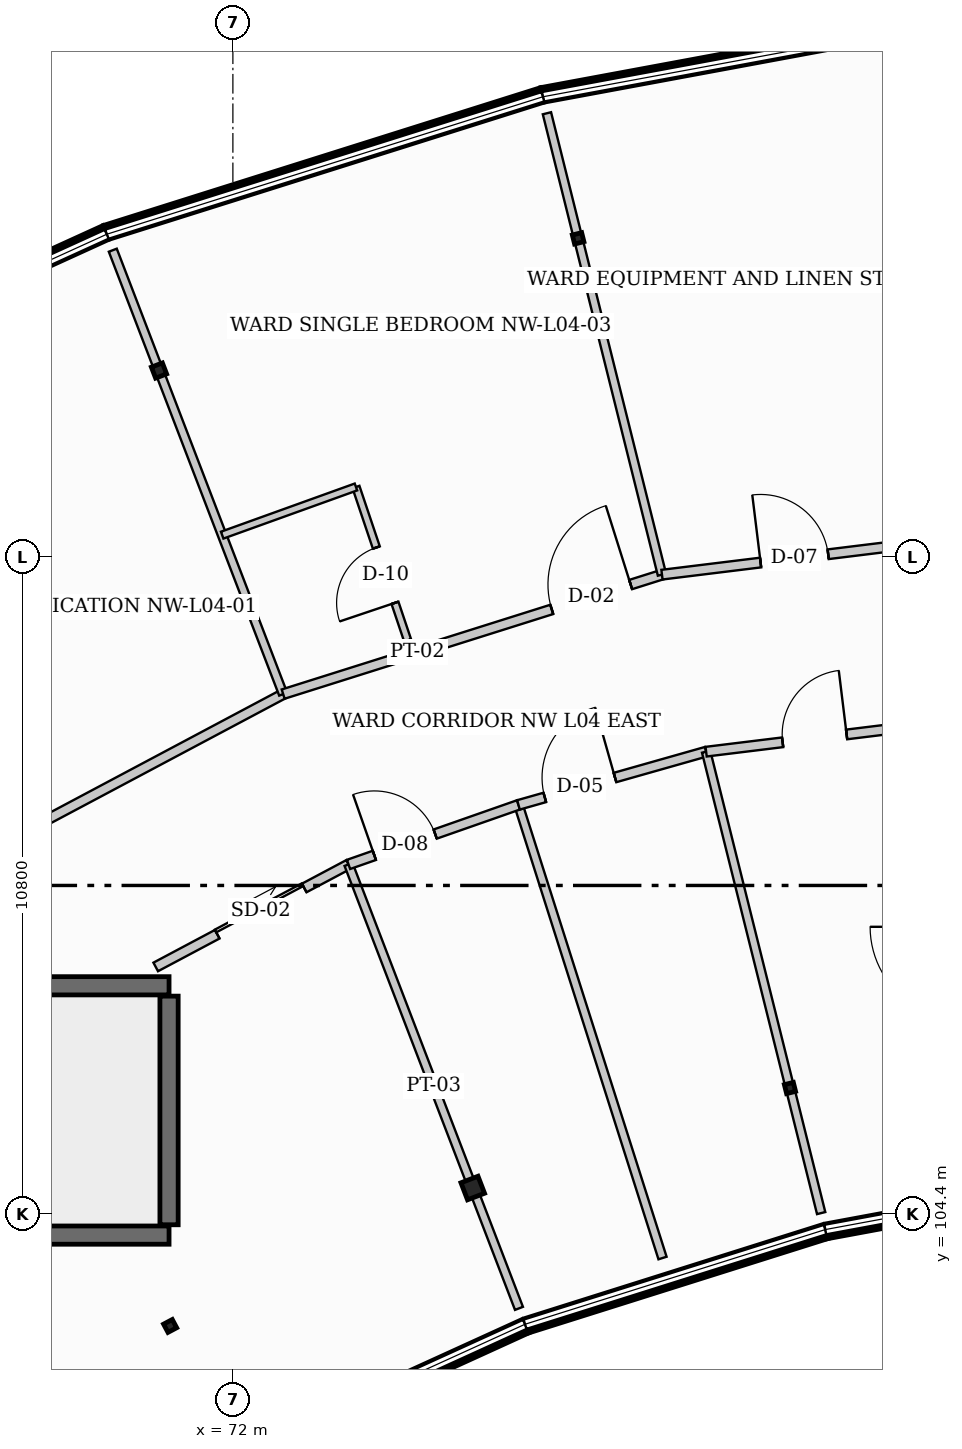
"""IFC4 building model, lengths in metres.
Left out: names, types, materials, properties, quantities, classifications, styles, units other than length and angle.
Written with IfcOpenShell. Run it as: python <this file> out.ifc"""

import sys

from ifc_helpers import new_model, si_unit, direction, frame, frame_2d, origin, origin_2d, place, context, subcontext, project, spatial, rectangle, hollow_rectangle, hollow_circle, i_section, extrude, element, fill, save


model = new_model("IFC4")
c1 = context("Model", 3, precision=1e-05, world=origin(), true_north=direction((0.0, 1.0)))
c2 = subcontext(c1, "Body", "Model", "MODEL_VIEW")
j1 = project(units=[si_unit("LENGTHUNIT", "METRE"), si_unit("PLANEANGLEUNIT", "RADIAN")], contexts=[c1])
p1 = place(None, origin())
s1 = spatial("IfcSite", under=j1, at=p1, CompositionType="ELEMENT")
p2 = place(p1, origin())
s2 = spatial("IfcBuilding", under=s1, at=p2, CompositionType="ELEMENT")
p3 = place(p2, frame((0.0, 0.0, 18.3)))
s3 = spatial("IfcBuildingStorey", under=s2, at=p3, CompositionType="ELEMENT", Elevation=18.3)
p4 = place(p3, frame((70.968, 102.556, 0.0), z_axis=(0.0, 0.0, 1.0), x_axis=(-0.469471562786, 0.882947592859, 0.0)))
e1 = element("IfcColumn", 1, at=p4, inside=s3, PredefinedType="COLUMN", context=c2, shape_type="SweptSolid", body=[
    extrude(i_section(OverallWidth=0.154, OverallDepth=0.162, WebThickness=0.008, FlangeThickness=0.011, at=origin_2d()), origin(), (0.0, 0.0, 1.0), 3.9),
])
p5 = place(p3, frame((70.785, 118.268, 0.0), z_axis=(0.0, 0.0, 1.0), x_axis=(-0.358367949545, 0.933580426497, 0.0)))
e2 = element("IfcColumn", 2, at=p5, inside=s3, PredefinedType="COLUMN", context=c2, shape_type="SweptSolid", body=[
    extrude(hollow_circle(Radius=0.097, WallThickness=0.008, at=origin_2d()), origin(), (0.0, 0.0, 1.0), 3.9),
])
p6 = place(p3, frame((75.945, 104.824, 0.0), z_axis=(0.0, 0.0, 1.0), x_axis=(-0.358367949545, 0.933580426497, 0.0)))
e3 = element("IfcColumn", 3, at=p6, inside=s3, PredefinedType="COLUMN", context=c2, shape_type="SweptSolid", body=[
    extrude(hollow_rectangle(XDim=0.3, YDim=0.3, WallThickness=0.012, at=origin_2d()), origin(), (0.0, 0.0, 1.0), 3.9),
])
p7 = place(p3, frame((77.678, 120.442, 0.0), z_axis=(0.0, 0.0, 1.0), x_axis=(-0.2419218956, 0.970295726276, 0.0)))
e4 = element("IfcColumn", 4, at=p7, inside=s3, PredefinedType="COLUMN", context=c2, shape_type="SweptSolid", body=[
    extrude(i_section(OverallWidth=0.153, OverallDepth=0.158, WebThickness=0.007, FlangeThickness=0.01, at=origin_2d()), origin(), (0.0, 0.0, 1.0), 3.9),
])
p8 = place(p3, frame((81.162, 106.469, 0.0), z_axis=(0.0, 0.0, 1.0), x_axis=(-0.2419218956, 0.970295726276, 0.0)))
e5 = element("IfcColumn", 5, at=p8, inside=s3, PredefinedType="COLUMN", context=c2, shape_type="SweptSolid", body=[
    extrude(i_section(OverallWidth=0.152, OverallDepth=0.152, WebThickness=0.006, FlangeThickness=0.007, at=origin_2d()), origin(), (0.0, 0.0, 1.0), 3.9),
])
p9 = place(p3, frame((62.25, 104.05, 0.0), z_axis=(0.0, 0.0, 1.0), x_axis=(1.0, 0.0, 0.0)))
e6 = element("IfcWall", 6, at=p9, inside=s3, PredefinedType="SHEAR", context=c2, shape_type="SweptSolid", body=[
    extrude(rectangle(XDim=8.7, YDim=0.3, at=frame_2d((4.35, 0.0))), origin(), (0.0, 0.0, 1.0), 3.9),
])
p10 = place(p9, frame((0.35, 0.0, 0.0)))
e7 = element("IfcOpeningElement", 7, at=p10, cuts=e6, PredefinedType="OPENING", context=c2, shape_type="SweptSolid", body=[
    extrude(rectangle(XDim=1.1, YDim=2.15, at=frame_2d((0.55, 1.075))), frame((0.0, 0.16, 0.0), z_axis=(0.0, -1.0, 0.0), x_axis=(1.0, 0.0, 0.0)), (0.0, 0.0, 1.0), 0.32),
])
p11 = place(p3, frame((70.95, 108.15, 0.0), z_axis=(0.0, 0.0, 1.0), x_axis=(-1.0, 0.0, 0.0)))
e8 = element("IfcWall", 8, at=p11, inside=s3, PredefinedType="SHEAR", context=c2, shape_type="SweptSolid", body=[
    extrude(rectangle(XDim=8.7, YDim=0.3, at=frame_2d((4.35, 0.0))), origin(), (0.0, 0.0, 1.0), 3.9),
])
p12 = place(p3, frame((70.95, 104.22, 0.0), z_axis=(0.0, 0.0, 1.0), x_axis=(0.0, 1.0, 0.0)))
e9 = element("IfcWall", 9, at=p12, inside=s3, PredefinedType="SHEAR", context=c2, shape_type="SweptSolid", body=[
    extrude(rectangle(XDim=3.76, YDim=0.3, at=frame_2d((1.88, 0.0))), origin(), (0.0, 0.0, 1.0), 3.9),
])
p13 = place(p3, frame((76.805, 102.584, 0.0), z_axis=(0.0, 0.0, 1.0), x_axis=(-0.909955822384, -0.414705198074, 0.0)))
e10 = element("IfcWall", 10, at=p13, inside=s3, PredefinedType="STANDARD", context=c2, shape_type="SweptSolid", body=[
    extrude(rectangle(XDim=5.177, YDim=0.22, at=frame_2d((2.588, 0.0))), origin(), (0.0, 0.0, 1.0), 1.05),
])
p14 = place(p3, frame((81.743, 104.141, 0.0), z_axis=(0.0, 0.0, 1.0), x_axis=(-0.953706582316, -0.300738681994, 0.0)))
e11 = element("IfcWall", 11, at=p14, inside=s3, PredefinedType="STANDARD", context=c2, shape_type="SweptSolid", body=[
    extrude(rectangle(XDim=5.178, YDim=0.22, at=frame_2d((2.589, 0.0))), origin(), (0.0, 0.0, 1.0), 1.05),
])
p15 = place(p3, frame((86.833, 105.084, 0.0), z_axis=(0.0, 0.0, 1.0), x_axis=(-0.98327293422, -0.182138235501, 0.0)))
e12 = element("IfcWall", 12, at=p15, inside=s3, PredefinedType="STANDARD", context=c2, shape_type="SweptSolid", body=[
    extrude(rectangle(XDim=5.177, YDim=0.22, at=frame_2d((2.588, 0.0))), origin(), (0.0, 0.0, 1.0), 1.05),
])
p16 = place(p3, frame((77.098, 122.77, 0.0), z_axis=(0.0, 0.0, 1.0), x_axis=(0.983242805192, 0.18230081195, 0.0)))
e13 = element("IfcWall", 13, at=p16, inside=s3, PredefinedType="STANDARD", context=c2, shape_type="SweptSolid", body=[
    extrude(rectangle(XDim=7.521, YDim=0.22, at=frame_2d((3.76, 0.0))), origin(), (0.0, 0.0, 1.0), 1.05),
])
p17 = place(p3, frame((69.925, 120.509, 0.0), z_axis=(0.0, 0.0, 1.0), x_axis=(0.953740021466, 0.300632618747, 0.0)))
e14 = element("IfcWall", 14, at=p17, inside=s3, PredefinedType="STANDARD", context=c2, shape_type="SweptSolid", body=[
    extrude(rectangle(XDim=7.521, YDim=0.22, at=frame_2d((3.76, 0.0))), origin(), (0.0, 0.0, 1.0), 1.05),
])
p18 = place(p3, frame((63.081, 117.39, 0.0), z_axis=(0.0, 0.0, 1.0), x_axis=(0.909953604353, 0.414710064895, 0.0)))
e15 = element("IfcWall", 15, at=p18, inside=s3, PredefinedType="STANDARD", context=c2, shape_type="SweptSolid", body=[
    extrude(rectangle(XDim=7.521, YDim=0.22, at=frame_2d((3.761, 0.0))), origin(), (0.0, 0.0, 1.0), 1.05),
])
p19 = place(p3, frame((64.389, 108.46, 0.0), z_axis=(0.0, 0.0, 1.0), x_axis=(0.882925792416, 0.46951256116, 0.0)))
e16 = element("IfcWall", 16, at=p19, inside=s3, PredefinedType="PARTITIONING", context=c2, shape_type="SweptSolid", body=[
    extrude(rectangle(XDim=9.557, YDim=0.16, at=frame_2d((4.778, 0.0))), origin(), (0.0, 0.0, 1.0), 2.933),
])
p20 = place(p19, frame((4.129, 0.0, 0.0)))
e17 = element("IfcOpeningElement", 17, at=p20, cuts=e16, PredefinedType="OPENING", context=c2, shape_type="SweptSolid", body=[
    extrude(rectangle(XDim=0.92, YDim=2.04, at=frame_2d((0.46, 1.02))), frame((0.0, 0.09, 0.0), z_axis=(0.0, -1.0, 0.0), x_axis=(1.0, 0.0, 0.0)), (0.0, 0.0, 1.0), 0.18),
])
p21 = place(p3, frame((72.827, 112.947, 0.0), z_axis=(0.0, 0.0, 1.0), x_axis=(-0.358342954102, 0.933590020965, 0.0)))
e18 = element("IfcWall", 18, at=p21, inside=s3, PredefinedType="PARTITIONING", context=c2, shape_type="SweptSolid", body=[
    extrude(rectangle(XDim=7.819, YDim=0.14, at=frame_2d((3.91, 0.0))), origin(), (0.0, 0.0, 1.0), 2.933),
])
p22 = place(p3, frame((70.731, 108.46, 0.0), z_axis=(0.0, 0.0, 1.0), x_axis=(0.882958125757, 0.46945175275, 0.0)))
e19 = element("IfcWall", 19, at=p22, inside=s3, PredefinedType="PARTITIONING", context=c2, shape_type="SweptSolid", body=[
    extrude(rectangle(XDim=3.592, YDim=0.16, at=frame_2d((1.796, 0.0))), origin(), (0.0, 0.0, 1.0), 2.933),
])
p23 = place(p22, frame((1.146, 0.0, 0.0)))
e20 = element("IfcOpeningElement", 20, at=p23, cuts=e19, PredefinedType="OPENING", context=c2, shape_type="SweptSolid", body=[
    extrude(rectangle(XDim=1.62, YDim=2.3, at=frame_2d((0.81, 1.15))), frame((0.0, 0.09, 0.0), z_axis=(0.0, -1.0, 0.0), x_axis=(1.0, 0.0, 0.0)), (0.0, 0.0, 1.0), 0.18),
])
p24 = place(p3, frame((73.902, 110.146, 0.0), z_axis=(0.0, 0.0, 1.0), x_axis=(0.358410014332, -0.933564278251, 0.0)))
e21 = element("IfcWall", 21, at=p24, inside=s3, PredefinedType="PARTITIONING", context=c2, shape_type="SweptSolid", body=[
    extrude(rectangle(XDim=7.821, YDim=0.14, at=frame_2d((3.91, 0.0))), origin(), (0.0, 0.0, 1.0), 2.933),
])
p25 = place(p3, frame((74.873, 113.832, 0.0), z_axis=(0.0, 0.0, 1.0), x_axis=(-0.319199781595, 0.947687448176, 0.0)))
e22 = element("IfcWall", 22, at=p25, inside=s3, PredefinedType="PARTITIONING", context=c2, shape_type="SweptSolid", body=[
    extrude(rectangle(XDim=2.66, YDim=0.12, at=frame_2d((1.33, 0.0))), origin(), (0.0, 0.0, 1.0), 3.189),
])
p26 = place(p25, frame((0.65, 0.0, 0.0)))
e23 = element("IfcOpeningElement", 23, at=p26, cuts=e22, PredefinedType="OPENING", context=c2, shape_type="SweptSolid", body=[
    extrude(rectangle(XDim=0.96, YDim=2.06, at=frame_2d((0.48, 1.03))), frame((0.0, 0.07, 0.0), z_axis=(0.0, -1.0, 0.0), x_axis=(1.0, 0.0, 0.0)), (0.0, 0.0, 1.0), 0.14),
])
p27 = place(p3, frame((71.824, 115.561, 0.0), z_axis=(0.0, 0.0, 1.0), x_axis=(0.940886080788, 0.338723165695, 0.0)))
e24 = element("IfcWall", 24, at=p27, inside=s3, PredefinedType="PARTITIONING", context=c2, shape_type="SweptSolid", body=[
    extrude(rectangle(XDim=2.338, YDim=0.12, at=frame_2d((1.169, 0.0))), origin(), (0.0, 0.0, 1.0), 2.933),
])
p28 = place(p3, frame((72.827, 112.947, 0.0), z_axis=(0.0, 0.0, 1.0), x_axis=(0.953736183483, 0.30064479426, 0.0)))
e25 = element("IfcWall", 25, at=p28, inside=s3, PredefinedType="PARTITIONING", context=c2, shape_type="SweptSolid", body=[
    extrude(rectangle(XDim=6.532, YDim=0.16, at=frame_2d((3.266, 0.0))), origin(), (0.0, 0.0, 1.0), 2.933),
])
p29 = place(p28, frame((4.632, 0.0, 0.0)))
e26 = element("IfcOpeningElement", 26, at=p29, cuts=e25, PredefinedType="OPENING", context=c2, shape_type="SweptSolid", body=[
    extrude(rectangle(XDim=1.36, YDim=2.18, at=frame_2d((0.68, 1.09))), frame((0.0, 0.09, 0.0), z_axis=(0.0, -1.0, 0.0), x_axis=(1.0, 0.0, 0.0)), (0.0, 0.0, 1.0), 0.18),
])
p30 = place(p3, frame((79.057, 114.911, 0.0), z_axis=(0.0, 0.0, 1.0), x_axis=(-0.241911207257, 0.970298391117, 0.0)))
e27 = element("IfcWall", 27, at=p30, inside=s3, PredefinedType="PARTITIONING", context=c2, shape_type="SweptSolid", body=[
    extrude(rectangle(XDim=7.82, YDim=0.14, at=frame_2d((3.91, 0.0))), origin(), (0.0, 0.0, 1.0), 2.938),
])
p31 = place(p3, frame((76.697, 111.125, 0.0), z_axis=(0.0, 0.0, 1.0), x_axis=(0.302952343331, -0.95300570705, 0.0)))
e28 = element("IfcWall", 28, at=p31, inside=s3, PredefinedType="PARTITIONING", context=c2, shape_type="SweptSolid", body=[
    extrude(rectangle(XDim=7.819, YDim=0.14, at=frame_2d((3.91, 0.0))), origin(), (0.0, 0.0, 1.0), 3.241),
])
p32 = place(p3, frame((73.902, 110.146, 0.0), z_axis=(0.0, 0.0, 1.0), x_axis=(0.943776070457, 0.330585433485, 0.0)))
e29 = element("IfcWall", 29, at=p32, inside=s3, PredefinedType="PARTITIONING", context=c2, shape_type="SweptSolid", body=[
    extrude(rectangle(XDim=2.961, YDim=0.16, at=frame_2d((1.481, 0.0))), origin(), (0.0, 0.0, 1.0), 2.933),
])
p33 = place(p32, frame((0.45, 0.0, 0.0)))
e30 = element("IfcOpeningElement", 30, at=p33, cuts=e29, PredefinedType="OPENING", context=c2, shape_type="SweptSolid", body=[
    extrude(rectangle(XDim=1.06, YDim=2.1, at=frame_2d((0.53, 1.05))), frame((0.0, 0.09, 0.0), z_axis=(0.0, -1.0, 0.0), x_axis=(1.0, 0.0, 0.0)), (0.0, 0.0, 1.0), 0.18),
])
p34 = place(p3, frame((76.697, 111.125, 0.0), z_axis=(0.0, 0.0, 1.0), x_axis=(0.962073473599, 0.272790453274, 0.0)))
e31 = element("IfcWall", 31, at=p34, inside=s3, PredefinedType="PARTITIONING", context=c2, shape_type="SweptSolid", body=[
    extrude(rectangle(XDim=3.208, YDim=0.16, at=frame_2d((1.604, 0.0))), origin(), (0.0, 0.0, 1.0), 2.938),
])
p35 = place(p34, frame((0.45, 0.0, 0.0)))
e32 = element("IfcOpeningElement", 32, at=p35, cuts=e31, PredefinedType="OPENING", context=c2, shape_type="SweptSolid", body=[
    extrude(rectangle(XDim=1.2, YDim=2.12, at=frame_2d((0.6, 1.06))), frame((0.0, 0.09, 0.0), z_axis=(0.0, -1.0, 0.0), x_axis=(1.0, 0.0, 0.0)), (0.0, 0.0, 1.0), 0.18),
])
p36 = place(p3, frame((79.783, 112.0, 0.0), z_axis=(0.0, 0.0, 1.0), x_axis=(0.241947927131, -0.970289235515, 0.0)))
e33 = element("IfcWall", 33, at=p36, inside=s3, PredefinedType="PARTITIONING", context=c2, shape_type="SweptSolid", body=[
    extrude(rectangle(XDim=7.82, YDim=0.14, at=frame_2d((3.91, 0.0))), origin(), (0.0, 0.0, 1.0), 2.938),
])
p37 = place(p3, frame((79.057, 114.911, 0.0), z_axis=(0.0, 0.0, 1.0), x_axis=(0.992532332473, 0.121981838793, 0.0)))
e34 = element("IfcWall", 34, at=p37, inside=s3, PredefinedType="PARTITIONING", context=c2, shape_type="SweptSolid", body=[
    extrude(rectangle(XDim=4.567, YDim=0.16, at=frame_2d((2.284, 0.0))), origin(), (0.0, 0.0, 1.0), 2.938),
])
p38 = place(p37, frame((1.634, 0.0, 0.0)))
e35 = element("IfcOpeningElement", 35, at=p38, cuts=e34, PredefinedType="OPENING", context=c2, shape_type="SweptSolid", body=[
    extrude(rectangle(XDim=1.12, YDim=2.08, at=frame_2d((0.56, 1.04))), frame((0.0, 0.09, 0.0), z_axis=(0.0, -1.0, 0.0), x_axis=(1.0, 0.0, 0.0)), (0.0, 0.0, 1.0), 0.18),
])
p39 = place(p3, frame((79.783, 112.0, 0.0), z_axis=(0.0, 0.0, 1.0), x_axis=(0.992559253302, 0.121762591482, 0.0)))
e36 = element("IfcWall", 36, at=p39, inside=s3, PredefinedType="PARTITIONING", context=c2, shape_type="SweptSolid", body=[
    extrude(rectangle(XDim=3.836, YDim=0.16, at=frame_2d((1.918, 0.0))), origin(), (0.0, 0.0, 1.0), 2.938),
])
p40 = place(p39, frame((1.268, 0.0, 0.0)))
e37 = element("IfcOpeningElement", 37, at=p40, cuts=e36, PredefinedType="OPENING", context=c2, shape_type="SweptSolid", body=[
    extrude(rectangle(XDim=1.06, YDim=2.1, at=frame_2d((0.53, 1.05))), frame((0.0, 0.09, 0.0), z_axis=(0.0, -1.0, 0.0), x_axis=(1.0, 0.0, 0.0)), (0.0, 0.0, 1.0), 0.18),
])
p41 = place(p23, origin())
e38 = element("IfcDoor", 38, at=p41, inside=s3, OperationType="SLIDING_TO_RIGHT", PredefinedType="DOOR", context=c2, shape_type="SweptSolid", body=[
    extrude(rectangle(XDim=1.62, YDim=2.3, at=frame_2d((0.81, 1.15))), frame((0.0, 0.025, 0.0), z_axis=(0.0, -1.0, 0.0), x_axis=(1.0, 0.0, 0.0)), (0.0, 0.0, 1.0), 0.05),
])
fill(e20, e38)
p42 = place(p26, origin())
e39 = element("IfcDoor", 39, at=p42, inside=s3, OperationType="SINGLE_SWING_LEFT", PredefinedType="DOOR", context=c2, shape_type="SweptSolid", body=[
    extrude(rectangle(XDim=0.96, YDim=2.06, at=frame_2d((0.48, 1.03))), frame((0.0, 0.025, 0.0), z_axis=(0.0, -1.0, 0.0), x_axis=(1.0, 0.0, 0.0)), (0.0, 0.0, 1.0), 0.05),
])
fill(e23, e39)
p43 = place(p29, origin())
e40 = element("IfcDoor", 40, at=p43, inside=s3, OperationType="SINGLE_SWING_RIGHT", PredefinedType="DOOR", context=c2, shape_type="SweptSolid", body=[
    extrude(rectangle(XDim=1.36, YDim=2.18, at=frame_2d((0.68, 1.09))), frame((0.0, 0.025, 0.0), z_axis=(0.0, -1.0, 0.0), x_axis=(1.0, 0.0, 0.0)), (0.0, 0.0, 1.0), 0.05),
])
fill(e26, e40)
p44 = place(p33, origin())
e41 = element("IfcDoor", 41, at=p44, inside=s3, OperationType="SINGLE_SWING_LEFT", PredefinedType="DOOR", context=c2, shape_type="SweptSolid", body=[
    extrude(rectangle(XDim=1.06, YDim=2.1, at=frame_2d((0.53, 1.05))), frame((0.0, 0.025, 0.0), z_axis=(0.0, -1.0, 0.0), x_axis=(1.0, 0.0, 0.0)), (0.0, 0.0, 1.0), 0.05),
])
fill(e30, e41)
p45 = place(p35, origin())
e42 = element("IfcDoor", 42, at=p45, inside=s3, OperationType="SINGLE_SWING_RIGHT", PredefinedType="DOOR", context=c2, shape_type="SweptSolid", body=[
    extrude(rectangle(XDim=1.2, YDim=2.12, at=frame_2d((0.6, 1.06))), frame((0.0, 0.025, 0.0), z_axis=(0.0, -1.0, 0.0), x_axis=(1.0, 0.0, 0.0)), (0.0, 0.0, 1.0), 0.05),
])
fill(e32, e42)
p46 = place(p38, origin())
e43 = element("IfcDoor", 43, at=p46, inside=s3, OperationType="SINGLE_SWING_LEFT", PredefinedType="DOOR", context=c2, shape_type="SweptSolid", body=[
    extrude(rectangle(XDim=1.12, YDim=2.08, at=frame_2d((0.56, 1.04))), frame((0.0, 0.025, 0.0), z_axis=(0.0, -1.0, 0.0), x_axis=(1.0, 0.0, 0.0)), (0.0, 0.0, 1.0), 0.05),
])
fill(e35, e43)
p47 = place(p40, origin())
e44 = element("IfcDoor", 44, at=p47, inside=s3, OperationType="SINGLE_SWING_RIGHT", PredefinedType="DOOR", context=c2, shape_type="SweptSolid", body=[
    extrude(rectangle(XDim=1.06, YDim=2.1, at=frame_2d((0.53, 1.05))), frame((0.0, 0.025, 0.0), z_axis=(0.0, -1.0, 0.0), x_axis=(1.0, 0.0, 0.0)), (0.0, 0.0, 1.0), 0.05),
])
fill(e37, e44)
save(model, sys.argv[1])
